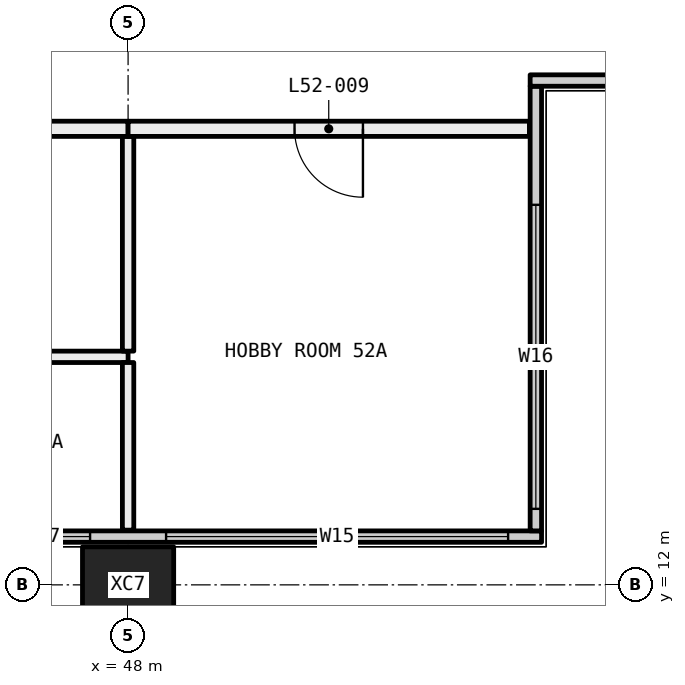
"""IFC4 building model, lengths in metres.
Left out: names, types, materials, properties, quantities, classifications, styles, units other than length and angle.
Written with IfcOpenShell. Run it as: python <this file> out.ifc"""

import sys

from ifc_helpers import new_model, si_unit, direction, frame, frame_2d, origin, origin_2d, place, context, subcontext, project, spatial, rectangle, hollow_rectangle, extrude, element, fill, save


model = new_model("IFC4")
c1 = context("Model", 3, precision=1e-05, world=origin(), true_north=direction((0.0, 1.0)))
c2 = subcontext(c1, "Body", "Model", "MODEL_VIEW")
j1 = project(units=[si_unit("LENGTHUNIT", "METRE"), si_unit("PLANEANGLEUNIT", "RADIAN")], contexts=[c1])
p1 = place(None, origin())
s1 = spatial("IfcSite", under=j1, at=p1, CompositionType="ELEMENT")
p2 = place(p1, origin())
s2 = spatial("IfcBuilding", under=s1, at=p2, CompositionType="ELEMENT")
p3 = place(p2, frame((0.0, 0.0, 196.2)))
s3 = spatial("IfcBuildingStorey", under=s2, at=p3, CompositionType="ELEMENT", Elevation=196.2)
p4 = place(p3, frame((48.0, 12.0, -0.4), z_axis=(0.0, 0.0, 1.0), x_axis=(1.0, 0.0, 0.0)))
e1 = element("IfcColumn", 1, at=p4, inside=s3, PredefinedType="COLUMN", context=c2, shape_type="SweptSolid", body=[
    extrude(hollow_rectangle(XDim=1.2, YDim=1.0, WallThickness=0.045, at=origin_2d()), origin(), (0.0, 0.0, 1.0), 3.45),
])
p5 = place(p3, frame((6.56, 12.635, 0.0), z_axis=(0.0, 0.0, 1.0), x_axis=(1.0, 0.0, 0.0)))
e2 = element("IfcWall", 2, at=p5, inside=s3, PredefinedType="ELEMENTEDWALL", context=c2, shape_type="SweptSolid", body=[
    extrude(rectangle(XDim=46.88, YDim=0.15, at=frame_2d((23.44, 0.0))), origin(), (0.0, 0.0, 1.0), 3.05),
])
p6 = place(p5, frame((0.44, 0.0, 0.45)))
e3 = element("IfcOpeningElement", 3, at=p6, cuts=e2, PredefinedType="OPENING", context=c2, shape_type="SweptSolid", body=[
    extrude(rectangle(XDim=4.5, YDim=2.55, at=frame_2d((2.25, 1.275))), frame((0.0, 0.085, 0.0), z_axis=(0.0, -1.0, 0.0), x_axis=(1.0, 0.0, 0.0)), (0.0, 0.0, 1.0), 0.17),
])
p7 = place(p5, frame((5.94, 0.0, 0.45)))
e4 = element("IfcOpeningElement", 4, at=p7, cuts=e2, PredefinedType="OPENING", context=c2, shape_type="SweptSolid", body=[
    extrude(rectangle(XDim=1.25, YDim=2.55, at=frame_2d((0.625, 1.275))), frame((0.0, 0.085, 0.0), z_axis=(0.0, -1.0, 0.0), x_axis=(1.0, 0.0, 0.0)), (0.0, 0.0, 1.0), 0.17),
])
p8 = place(p5, frame((9.69, 0.0, 0.45)))
e5 = element("IfcOpeningElement", 5, at=p8, cuts=e2, PredefinedType="OPENING", context=c2, shape_type="SweptSolid", body=[
    extrude(rectangle(XDim=1.25, YDim=2.55, at=frame_2d((0.625, 1.275))), frame((0.0, 0.085, 0.0), z_axis=(0.0, -1.0, 0.0), x_axis=(1.0, 0.0, 0.0)), (0.0, 0.0, 1.0), 0.17),
])
p9 = place(p5, frame((11.94, 0.0, 0.45)))
e6 = element("IfcOpeningElement", 6, at=p9, cuts=e2, PredefinedType="OPENING", context=c2, shape_type="SweptSolid", body=[
    extrude(rectangle(XDim=1.25, YDim=2.55, at=frame_2d((0.625, 1.275))), frame((0.0, 0.085, 0.0), z_axis=(0.0, -1.0, 0.0), x_axis=(1.0, 0.0, 0.0)), (0.0, 0.0, 1.0), 0.17),
])
p10 = place(p5, frame((15.69, 0.0, 0.45)))
e7 = element("IfcOpeningElement", 7, at=p10, cuts=e2, PredefinedType="OPENING", context=c2, shape_type="SweptSolid", body=[
    extrude(rectangle(XDim=1.25, YDim=2.55, at=frame_2d((0.625, 1.275))), frame((0.0, 0.085, 0.0), z_axis=(0.0, -1.0, 0.0), x_axis=(1.0, 0.0, 0.0)), (0.0, 0.0, 1.0), 0.17),
])
p11 = place(p5, frame((17.94, 0.0, 0.45)))
e8 = element("IfcOpeningElement", 8, at=p11, cuts=e2, PredefinedType="OPENING", context=c2, shape_type="SweptSolid", body=[
    extrude(rectangle(XDim=1.25, YDim=2.55, at=frame_2d((0.625, 1.275))), frame((0.0, 0.085, 0.0), z_axis=(0.0, -1.0, 0.0), x_axis=(1.0, 0.0, 0.0)), (0.0, 0.0, 1.0), 0.17),
])
p12 = place(p5, frame((21.69, 0.0, 0.45)))
e9 = element("IfcOpeningElement", 9, at=p12, cuts=e2, PredefinedType="OPENING", context=c2, shape_type="SweptSolid", body=[
    extrude(rectangle(XDim=1.25, YDim=2.55, at=frame_2d((0.625, 1.275))), frame((0.0, 0.085, 0.0), z_axis=(0.0, -1.0, 0.0), x_axis=(1.0, 0.0, 0.0)), (0.0, 0.0, 1.0), 0.17),
])
p13 = place(p5, frame((23.94, 0.0, 0.45)))
e10 = element("IfcOpeningElement", 10, at=p13, cuts=e2, PredefinedType="OPENING", context=c2, shape_type="SweptSolid", body=[
    extrude(rectangle(XDim=1.25, YDim=2.55, at=frame_2d((0.625, 1.275))), frame((0.0, 0.085, 0.0), z_axis=(0.0, -1.0, 0.0), x_axis=(1.0, 0.0, 0.0)), (0.0, 0.0, 1.0), 0.17),
])
p14 = place(p5, frame((27.69, 0.0, 0.45)))
e11 = element("IfcOpeningElement", 11, at=p14, cuts=e2, PredefinedType="OPENING", context=c2, shape_type="SweptSolid", body=[
    extrude(rectangle(XDim=1.25, YDim=2.55, at=frame_2d((0.625, 1.275))), frame((0.0, 0.085, 0.0), z_axis=(0.0, -1.0, 0.0), x_axis=(1.0, 0.0, 0.0)), (0.0, 0.0, 1.0), 0.17),
])
p15 = place(p5, frame((29.94, 0.0, 0.45)))
e12 = element("IfcOpeningElement", 12, at=p15, cuts=e2, PredefinedType="OPENING", context=c2, shape_type="SweptSolid", body=[
    extrude(rectangle(XDim=1.25, YDim=2.55, at=frame_2d((0.625, 1.275))), frame((0.0, 0.085, 0.0), z_axis=(0.0, -1.0, 0.0), x_axis=(1.0, 0.0, 0.0)), (0.0, 0.0, 1.0), 0.17),
])
p16 = place(p5, frame((33.69, 0.0, 0.45)))
e13 = element("IfcOpeningElement", 13, at=p16, cuts=e2, PredefinedType="OPENING", context=c2, shape_type="SweptSolid", body=[
    extrude(rectangle(XDim=1.25, YDim=2.55, at=frame_2d((0.625, 1.275))), frame((0.0, 0.085, 0.0), z_axis=(0.0, -1.0, 0.0), x_axis=(1.0, 0.0, 0.0)), (0.0, 0.0, 1.0), 0.17),
])
p17 = place(p5, frame((35.94, 0.0, 0.45)))
e14 = element("IfcOpeningElement", 14, at=p17, cuts=e2, PredefinedType="OPENING", context=c2, shape_type="SweptSolid", body=[
    extrude(rectangle(XDim=1.25, YDim=2.55, at=frame_2d((0.625, 1.275))), frame((0.0, 0.085, 0.0), z_axis=(0.0, -1.0, 0.0), x_axis=(1.0, 0.0, 0.0)), (0.0, 0.0, 1.0), 0.17),
])
p18 = place(p5, frame((39.69, 0.0, 0.45)))
e15 = element("IfcOpeningElement", 15, at=p18, cuts=e2, PredefinedType="OPENING", context=c2, shape_type="SweptSolid", body=[
    extrude(rectangle(XDim=1.25, YDim=2.55, at=frame_2d((0.625, 1.275))), frame((0.0, 0.085, 0.0), z_axis=(0.0, -1.0, 0.0), x_axis=(1.0, 0.0, 0.0)), (0.0, 0.0, 1.0), 0.17),
])
p19 = place(p5, frame((41.94, 0.0, 0.45)))
e16 = element("IfcOpeningElement", 16, at=p19, cuts=e2, PredefinedType="OPENING", context=c2, shape_type="SweptSolid", body=[
    extrude(rectangle(XDim=4.5, YDim=2.55, at=frame_2d((2.25, 1.275))), frame((0.0, 0.085, 0.0), z_axis=(0.0, -1.0, 0.0), x_axis=(1.0, 0.0, 0.0)), (0.0, 0.0, 1.0), 0.17),
])
p20 = place(p3, frame((53.365, 12.71, 0.0), z_axis=(0.0, 0.0, 1.0), x_axis=(0.0, 1.0, 0.0)))
e17 = element("IfcWall", 17, at=p20, inside=s3, PredefinedType="ELEMENTEDWALL", context=c2, shape_type="SweptSolid", body=[
    extrude(rectangle(XDim=5.85, YDim=0.15, at=frame_2d((2.925, 0.0))), origin(), (0.0, 0.0, 1.0), 3.05),
])
p21 = place(p20, frame((0.29, 0.0, 0.45)))
e18 = element("IfcOpeningElement", 18, at=p21, cuts=e17, PredefinedType="OPENING", context=c2, shape_type="SweptSolid", body=[
    extrude(rectangle(XDim=4.0, YDim=2.55, at=frame_2d((2.0, 1.275))), frame((0.0, 0.085, 0.0), z_axis=(0.0, -1.0, 0.0), x_axis=(1.0, 0.0, 0.0)), (0.0, 0.0, 1.0), 0.17),
])
p22 = place(p3, frame((53.29, 18.635, 0.0), z_axis=(0.0, 0.0, 1.0), x_axis=(1.0, 0.0, 0.0)))
e19 = element("IfcWall", 19, at=p22, inside=s3, PredefinedType="ELEMENTEDWALL", context=c2, shape_type="SweptSolid", body=[
    extrude(rectangle(XDim=6.15, YDim=0.15, at=frame_2d((3.075, 0.0))), origin(), (0.0, 0.0, 1.0), 3.05),
])
p23 = place(p22, frame((1.71, 0.0, 0.45)))
e20 = element("IfcOpeningElement", 20, at=p23, cuts=e19, PredefinedType="OPENING", context=c2, shape_type="SweptSolid", body=[
    extrude(rectangle(XDim=4.0, YDim=2.55, at=frame_2d((2.0, 1.275))), frame((0.0, 0.085, 0.0), z_axis=(0.0, -1.0, 0.0), x_axis=(1.0, 0.0, 0.0)), (0.0, 0.0, 1.0), 0.17),
])
p24 = place(p3, frame((48.0, 15.0, 0.0), z_axis=(0.0, 0.0, 1.0), x_axis=(-1.0, 0.0, 0.0)))
e21 = element("IfcWall", 21, at=p24, inside=s3, PredefinedType="PARTITIONING", context=c2, shape_type="SweptSolid", body=[
    extrude(rectangle(XDim=5.925, YDim=0.15, at=frame_2d((2.962, 0.0))), origin(), (0.0, 0.0, 1.0), 3.05),
])
p25 = place(p3, frame((48.0, 12.72, 0.0), z_axis=(0.0, 0.0, 1.0), x_axis=(0.0, 1.0, 0.0)))
e22 = element("IfcWall", 22, at=p25, inside=s3, PredefinedType="PARTITIONING", context=c2, shape_type="SweptSolid", body=[
    extrude(rectangle(XDim=2.205, YDim=0.15, at=frame_2d((1.103, 0.0))), origin(), (0.0, 0.0, 1.0), 3.05),
])
p26 = place(p3, frame((48.0, 15.075, 0.0), z_axis=(0.0, 0.0, 1.0), x_axis=(0.0, 1.0, 0.0)))
e23 = element("IfcWall", 23, at=p26, inside=s3, PredefinedType="PARTITIONING", context=c2, shape_type="SweptSolid", body=[
    extrude(rectangle(XDim=2.825, YDim=0.15, at=frame_2d((1.413, 0.0))), origin(), (0.0, 0.0, 1.0), 3.05),
])
p27 = place(p3, frame((48.0, 18.0, 0.0), z_axis=(0.0, 0.0, 1.0), x_axis=(-1.0, 0.0, 0.0)))
e24 = element("IfcWall", 24, at=p27, inside=s3, PredefinedType="PARTITIONING", context=c2, shape_type="SweptSolid", body=[
    extrude(rectangle(XDim=6.0, YDim=0.2, at=frame_2d((3.0, 0.0))), origin(), (0.0, 0.0, 1.0), 3.05),
])
p28 = place(p3, frame((53.28, 18.0, 0.0), z_axis=(0.0, 0.0, 1.0), x_axis=(-1.0, 0.0, 0.0)))
e25 = element("IfcWall", 25, at=p28, inside=s3, PredefinedType="PARTITIONING", context=c2, shape_type="SweptSolid", body=[
    extrude(rectangle(XDim=5.28, YDim=0.2, at=frame_2d((2.64, 0.0))), origin(), (0.0, 0.0, 1.0), 3.05),
])
p29 = place(p28, frame((2.19, 0.0, 0.0)))
e26 = element("IfcOpeningElement", 26, at=p29, cuts=e25, PredefinedType="OPENING", context=c2, shape_type="SweptSolid", body=[
    extrude(rectangle(XDim=0.9, YDim=2.1, at=frame_2d((0.45, 1.05))), frame((0.0, 0.11, 0.0), z_axis=(0.0, -1.0, 0.0), x_axis=(1.0, 0.0, 0.0)), (0.0, 0.0, 1.0), 0.22),
])
p30 = place(p18, origin())
e27 = element("IfcWindow", 27, at=p30, inside=s3, PartitioningType="SINGLE_PANEL", PredefinedType="WINDOW", context=c2, shape_type="SweptSolid", body=[
    extrude(rectangle(XDim=1.25, YDim=2.55, at=frame_2d((0.625, 1.275))), frame((0.0, 0.03, 0.0), z_axis=(0.0, -1.0, 0.0), x_axis=(1.0, 0.0, 0.0)), (0.0, 0.0, 1.0), 0.06),
])
fill(e15, e27)
p31 = place(p19, origin())
e28 = element("IfcWindow", 28, at=p31, inside=s3, PartitioningType="SINGLE_PANEL", PredefinedType="WINDOW", context=c2, shape_type="SweptSolid", body=[
    extrude(rectangle(XDim=4.5, YDim=2.55, at=frame_2d((2.25, 1.275))), frame((0.0, 0.03, 0.0), z_axis=(0.0, -1.0, 0.0), x_axis=(1.0, 0.0, 0.0)), (0.0, 0.0, 1.0), 0.06),
])
fill(e16, e28)
p32 = place(p21, origin())
e29 = element("IfcWindow", 29, at=p32, inside=s3, PartitioningType="SINGLE_PANEL", PredefinedType="WINDOW", context=c2, shape_type="SweptSolid", body=[
    extrude(rectangle(XDim=4.0, YDim=2.55, at=frame_2d((2.0, 1.275))), frame((0.0, 0.03, 0.0), z_axis=(0.0, -1.0, 0.0), x_axis=(1.0, 0.0, 0.0)), (0.0, 0.0, 1.0), 0.06),
])
fill(e18, e29)
p33 = place(p29, origin())
e30 = element("IfcDoor", 30, at=p33, inside=s3, OperationType="SINGLE_SWING_RIGHT", PredefinedType="DOOR", context=c2, shape_type="SweptSolid", body=[
    extrude(rectangle(XDim=0.9, YDim=2.1, at=frame_2d((0.45, 1.05))), frame((0.0, 0.025, 0.0), z_axis=(0.0, -1.0, 0.0), x_axis=(1.0, 0.0, 0.0)), (0.0, 0.0, 1.0), 0.05),
])
fill(e26, e30)
save(model, sys.argv[1])
